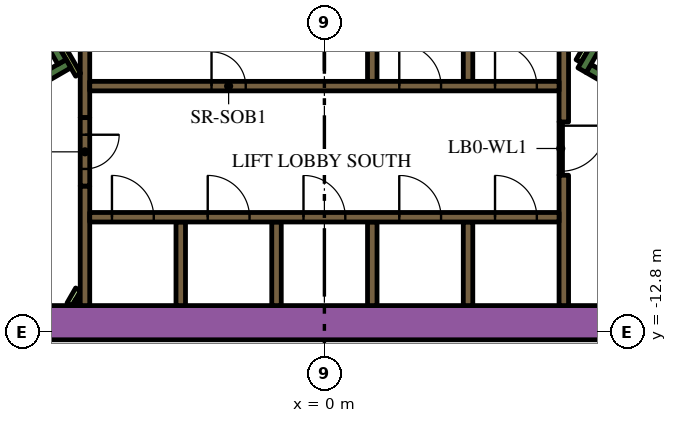
"""IFC4 building model, lengths in metres.
Left out: names, types, materials, properties, quantities, classifications, styles, units other than length and angle.
Written with IfcOpenShell. Run it as: python <this file> out.ifc"""

import sys

from ifc_helpers import new_model, si_unit, direction, frame, frame_2d, origin, place, context, subcontext, project, spatial, rectangle, extrude, element, fill, save


model = new_model("IFC4")
c1 = context("Model", 3, precision=1e-05, world=origin(), true_north=direction((0.0, 1.0)))
c2 = subcontext(c1, "Body", "Model", "MODEL_VIEW")
j1 = project(units=[si_unit("LENGTHUNIT", "METRE"), si_unit("PLANEANGLEUNIT", "RADIAN")], contexts=[c1])
p1 = place(None, origin())
s1 = spatial("IfcSite", under=j1, at=p1, CompositionType="ELEMENT")
p2 = place(p1, origin())
s2 = spatial("IfcBuilding", under=s1, at=p2, CompositionType="ELEMENT")
p3 = place(p2, frame((0.0, 0.0, 91.5)))
s3 = spatial("IfcBuildingStorey", under=s2, at=p3, CompositionType="ELEMENT", Elevation=91.5)
p4 = place(p3, frame((-12.019, -12.55, 0.0), z_axis=(0.0, 0.0, 1.0), x_axis=(1.0, 0.0, 0.0)))
e1 = element("IfcWall", 1, at=p4, inside=s3, PredefinedType="SOLIDWALL", context=c2, shape_type="SweptSolid", body=[
    extrude(rectangle(XDim=21.63, YDim=0.9, at=frame_2d((10.815, 0.0))), origin(), (0.0, 0.0, 1.0), 3.9),
])
p5 = place(p3, frame((12.84, -9.261, 0.0), z_axis=(0.0, 0.0, 1.0), x_axis=(-0.866013990052, 0.500019768644, 0.0)))
e2 = element("IfcWall", 2, at=p5, inside=s3, PredefinedType="SOLIDWALL", context=c2, shape_type="SweptSolid", body=[
    extrude(rectangle(XDim=6.8, YDim=0.25, at=frame_2d((3.4, 0.0))), origin(), (0.0, 0.0, 1.0), 3.9),
])
p6 = place(p3, frame((6.78, -5.906, 0.0), z_axis=(0.0, 0.0, 1.0), x_axis=(0.500223362819, 0.865896406789, 0.0)))
e3 = element("IfcWall", 3, at=p6, inside=s3, PredefinedType="SOLIDWALL", context=c2, shape_type="SweptSolid", body=[
    extrude(rectangle(XDim=0.675, YDim=0.25, at=frame_2d((0.337, 0.0))), origin(), (0.0, 0.0, 1.0), 3.9),
])
p7 = place(p3, frame((-12.84, -9.261, 0.0), z_axis=(0.0, 0.0, 1.0), x_axis=(0.866016039709, 0.500016218704, 0.0)))
e4 = element("IfcWall", 4, at=p7, inside=s3, PredefinedType="SOLIDWALL", context=c2, shape_type="SweptSolid", body=[
    extrude(rectangle(XDim=7.05, YDim=0.25, at=frame_2d((3.525, 0.0))), origin(), (0.0, 0.0, 1.0), 3.9),
])
p8 = place(p3, frame((-6.905, -5.69, 0.0), z_axis=(0.0, 0.0, 1.0), x_axis=(-0.500402024738, 0.865793170242, 0.0)))
e5 = element("IfcWall", 5, at=p8, inside=s3, PredefinedType="SOLIDWALL", context=c2, shape_type="SweptSolid", body=[
    extrude(rectangle(XDim=0.425, YDim=0.25, at=frame_2d((0.212, 0.0))), origin(), (0.0, 0.0, 1.0), 3.9),
])
p9 = place(p3, frame((-3.78, -12.1, 0.0), z_axis=(0.0, 0.0, 1.0), x_axis=(0.0, 1.0, 0.0)))
e6 = element("IfcWall", 6, at=p9, inside=s3, PredefinedType="SOLIDWALL", context=c2, shape_type="SweptSolid", body=[
    extrude(rectangle(XDim=2.2, YDim=0.25, at=frame_2d((1.1, 0.0))), origin(), (0.0, 0.0, 1.0), 3.9),
])
p10 = place(p3, frame((-6.3, -12.1, 0.0), z_axis=(0.0, 0.0, 1.0), x_axis=(0.0, 1.0, 0.0)))
e7 = element("IfcWall", 7, at=p10, inside=s3, PredefinedType="SOLIDWALL", context=c2, shape_type="SweptSolid", body=[
    extrude(rectangle(XDim=3.146, YDim=0.25, at=frame_2d((1.573, 0.0))), origin(), (0.0, 0.0, 1.0), 3.9),
])
p11 = place(p3, frame((6.3, -8.67, 0.0), z_axis=(0.0, 0.0, 1.0), x_axis=(0.0, -1.0, 0.0)))
e8 = element("IfcWall", 8, at=p11, inside=s3, PredefinedType="SOLIDWALL", context=c2, shape_type="SweptSolid", body=[
    extrude(rectangle(XDim=3.43, YDim=0.25, at=frame_2d((1.715, 0.0))), origin(), (0.0, 0.0, 1.0), 3.9),
])
p12 = place(p3, frame((6.3, -7.268, 0.0), z_axis=(0.0, 0.0, 1.0), x_axis=(0.0, 1.0, 0.0)))
e9 = element("IfcWall", 9, at=p12, inside=s3, PredefinedType="SOLIDWALL", context=c2, shape_type="SweptSolid", body=[
    extrude(rectangle(XDim=3.268, YDim=0.25, at=frame_2d((1.634, 0.0))), origin(), (0.0, 0.0, 1.0), 3.9),
])
for number, where, z_axis, x_axis in (
    (10, (3.78, -4.0, 0.0), (0.0, 0.0, 1.0), (0.0, -1.0, 0.0)),
    (11, (1.26, -4.0, 0.0), (0.0, 0.0, 1.0), (0.0, -1.0, 0.0)),
):
    element("IfcWall", number, at=place(p3, frame(where, z_axis=z_axis, x_axis=x_axis)), inside=s3, PredefinedType="SOLIDWALL", context=c2, shape_type="SweptSolid", body=[
        extrude(rectangle(XDim=2.2, YDim=0.25, at=frame_2d((1.1, 0.0))), origin(), (0.0, 0.0, 1.0), 3.9),
    ])
p13 = place(p3, frame((-6.3, -4.0, 0.0), z_axis=(0.0, 0.0, 1.0), x_axis=(0.0, -1.0, 0.0)))
e12 = element("IfcWall", 12, at=p13, inside=s3, PredefinedType="SOLIDWALL", context=c2, shape_type="SweptSolid", body=[
    extrude(rectangle(XDim=3.154, YDim=0.25, at=frame_2d((1.577, 0.0))), origin(), (0.0, 0.0, 1.0), 3.9),
])
for number, where, z_axis, x_axis in (
    (13, (3.78, -12.1, 0.0), (0.0, 0.0, 1.0), (0.0, 1.0, 0.0)),
    (14, (1.26, -12.1, 0.0), (0.0, 0.0, 1.0), (0.0, 1.0, 0.0)),
    (15, (-1.26, -12.1, 0.0), (0.0, 0.0, 1.0), (0.0, 1.0, 0.0)),
):
    element("IfcWall", number, at=place(p3, frame(where, z_axis=z_axis, x_axis=x_axis)), inside=s3, PredefinedType="SOLIDWALL", context=c2, shape_type="SweptSolid", body=[
        extrude(rectangle(XDim=2.2, YDim=0.25, at=frame_2d((1.1, 0.0))), origin(), (0.0, 0.0, 1.0), 3.9),
    ])
p14 = place(p3, frame((-6.708, -12.068, 0.0), z_axis=(0.0, 0.0, 1.0), x_axis=(0.500000789788, 0.8660249478, 0.0)))
e16 = element("IfcWall", 16, at=p14, inside=s3, PredefinedType="PARTITIONING", context=c2, shape_type="SweptSolid", body=[
    extrude(rectangle(XDim=0.456, YDim=0.15, at=frame_2d((0.228, 0.0))), origin(), (0.0, 0.0, 1.0), 2.75),
])
p15 = place(p3, frame((-6.534, -12.068, 0.0), z_axis=(0.0, 0.0, 1.0), x_axis=(0.500240224089, 0.865886665912, 0.0)))
e17 = element("IfcWall", 17, at=p15, inside=s3, PredefinedType="PARTITIONING", context=c2, shape_type="SweptSolid", body=[
    extrude(rectangle(XDim=0.109, YDim=0.15, at=frame_2d((0.054, 0.0))), origin(), (0.0, 0.0, 1.0), 2.75),
])
p16 = place(p3, frame((-6.48, -6.027, 0.0), z_axis=(0.0, 0.0, 1.0), x_axis=(-0.499927229454, 0.866067413802, 0.0)))
e18 = element("IfcWall", 18, at=p16, inside=s3, PredefinedType="PARTITIONING", context=c2, shape_type="SweptSolid", body=[
    extrude(rectangle(XDim=0.929, YDim=0.15, at=frame_2d((0.464, 0.0))), origin(), (0.0, 0.0, 1.0), 3.9),
])
p17 = place(p3, frame((6.945, -5.222, 0.0), z_axis=(0.0, 0.0, 1.0), x_axis=(-0.499818422106, -0.866130212453, 0.0)))
e19 = element("IfcWall", 19, at=p17, inside=s3, PredefinedType="PARTITIONING", context=c2, shape_type="SweptSolid", body=[
    extrude(rectangle(XDim=0.514, YDim=0.15, at=frame_2d((0.257, 0.0))), origin(), (0.0, 0.0, 1.0), 2.75),
])
p18 = place(p3, frame((-6.175, -9.775, 0.0), z_axis=(0.0, 0.0, 1.0), x_axis=(1.0, 0.0, 0.0)))
e20 = element("IfcWall", 20, at=p18, inside=s3, PredefinedType="SOLIDWALL", context=c2, shape_type="SweptSolid", body=[
    extrude(rectangle(XDim=12.35, YDim=0.25, at=frame_2d((6.175, 0.0))), origin(), (0.0, 0.0, 1.0), 3.9),
])
p19 = place(p18, frame((0.585, 0.0, 0.0)))
e21 = element("IfcOpeningElement", 21, at=p19, cuts=e20, PredefinedType="OPENING", context=c2, shape_type="SweptSolid", body=[
    extrude(rectangle(XDim=1.1, YDim=2.1, at=frame_2d((0.55, 1.05))), frame((0.0, 0.135, 0.0), z_axis=(0.0, -1.0, 0.0), x_axis=(1.0, 0.0, 0.0)), (0.0, 0.0, 1.0), 0.27),
])
p20 = place(p18, frame((3.105, 0.0, 0.0)))
e22 = element("IfcOpeningElement", 22, at=p20, cuts=e20, PredefinedType="OPENING", context=c2, shape_type="SweptSolid", body=[
    extrude(rectangle(XDim=1.1, YDim=2.1, at=frame_2d((0.55, 1.05))), frame((0.0, 0.135, 0.0), z_axis=(0.0, -1.0, 0.0), x_axis=(1.0, 0.0, 0.0)), (0.0, 0.0, 1.0), 0.27),
])
p21 = place(p18, frame((5.625, 0.0, 0.0)))
e23 = element("IfcOpeningElement", 23, at=p21, cuts=e20, PredefinedType="OPENING", context=c2, shape_type="SweptSolid", body=[
    extrude(rectangle(XDim=1.1, YDim=2.1, at=frame_2d((0.55, 1.05))), frame((0.0, 0.135, 0.0), z_axis=(0.0, -1.0, 0.0), x_axis=(1.0, 0.0, 0.0)), (0.0, 0.0, 1.0), 0.27),
])
p22 = place(p18, frame((8.145, 0.0, 0.0)))
e24 = element("IfcOpeningElement", 24, at=p22, cuts=e20, PredefinedType="OPENING", context=c2, shape_type="SweptSolid", body=[
    extrude(rectangle(XDim=1.1, YDim=2.1, at=frame_2d((0.55, 1.05))), frame((0.0, 0.135, 0.0), z_axis=(0.0, -1.0, 0.0), x_axis=(1.0, 0.0, 0.0)), (0.0, 0.0, 1.0), 0.27),
])
p23 = place(p18, frame((10.665, 0.0, 0.0)))
e25 = element("IfcOpeningElement", 25, at=p23, cuts=e20, PredefinedType="OPENING", context=c2, shape_type="SweptSolid", body=[
    extrude(rectangle(XDim=1.1, YDim=2.1, at=frame_2d((0.55, 1.05))), frame((0.0, 0.135, 0.0), z_axis=(0.0, -1.0, 0.0), x_axis=(1.0, 0.0, 0.0)), (0.0, 0.0, 1.0), 0.27),
])
p24 = place(p3, frame((-6.175, -6.325, 0.0), z_axis=(0.0, 0.0, 1.0), x_axis=(1.0, 0.0, 0.0)))
e26 = element("IfcWall", 26, at=p24, inside=s3, PredefinedType="SOLIDWALL", context=c2, shape_type="SweptSolid", body=[
    extrude(rectangle(XDim=12.35, YDim=0.25, at=frame_2d((6.175, 0.0))), origin(), (0.0, 0.0, 1.0), 3.9),
])
p25 = place(p24, frame((3.205, 0.0, 0.0)))
e27 = element("IfcOpeningElement", 27, at=p25, cuts=e26, PredefinedType="OPENING", context=c2, shape_type="SweptSolid", body=[
    extrude(rectangle(XDim=0.9, YDim=2.1, at=frame_2d((0.45, 1.05))), frame((0.0, 0.135, 0.0), z_axis=(0.0, -1.0, 0.0), x_axis=(1.0, 0.0, 0.0)), (0.0, 0.0, 1.0), 0.27),
])
p26 = place(p24, frame((8.145, 0.0, 0.0)))
e28 = element("IfcOpeningElement", 28, at=p26, cuts=e26, PredefinedType="OPENING", context=c2, shape_type="SweptSolid", body=[
    extrude(rectangle(XDim=1.1, YDim=2.1, at=frame_2d((0.55, 1.05))), frame((0.0, 0.135, 0.0), z_axis=(0.0, -1.0, 0.0), x_axis=(1.0, 0.0, 0.0)), (0.0, 0.0, 1.0), 0.27),
])
p27 = place(p24, frame((10.665, 0.0, 0.0)))
e29 = element("IfcOpeningElement", 29, at=p27, cuts=e26, PredefinedType="OPENING", context=c2, shape_type="SweptSolid", body=[
    extrude(rectangle(XDim=1.1, YDim=2.1, at=frame_2d((0.55, 1.05))), frame((0.0, 0.135, 0.0), z_axis=(0.0, -1.0, 0.0), x_axis=(1.0, 0.0, 0.0)), (0.0, 0.0, 1.0), 0.27),
])
p28 = place(p3, frame((-6.3, -7.154, 0.0), z_axis=(0.0, 0.0, 1.0), x_axis=(0.0, -1.0, 0.0)))
e30 = element("IfcWall", 30, at=p28, inside=s3, PredefinedType="SOLIDWALL", context=c2, shape_type="SweptSolid", body=[
    extrude(rectangle(XDim=1.8, YDim=0.25, at=frame_2d((0.9, 0.0))), origin(), (0.0, 0.0, 1.0), 3.9),
])
p29 = place(p28, frame((0.45, 0.0, 0.0)))
e31 = element("IfcOpeningElement", 31, at=p29, cuts=e30, PredefinedType="OPENING", context=c2, shape_type="SweptSolid", body=[
    extrude(rectangle(XDim=0.9, YDim=2.1, at=frame_2d((0.45, 1.05))), frame((0.0, 0.135, 0.0), z_axis=(0.0, -1.0, 0.0), x_axis=(1.0, 0.0, 0.0)), (0.0, 0.0, 1.0), 0.27),
])
p30 = place(p3, frame((6.22, -7.266, 0.0), z_axis=(0.0, 0.0, 1.0), x_axis=(0.0, -1.0, 0.0)))
e32 = element("IfcWall", 32, at=p30, inside=s3, PredefinedType="PARTITIONING", context=c2, shape_type="SweptSolid", body=[
    extrude(rectangle(XDim=1.4, YDim=0.09, at=frame_2d((0.7, 0.0))), origin(), (0.0, 0.0, 1.0), 2.75),
])
p31 = place(p30, frame((0.1, 0.0, 0.0)))
e33 = element("IfcOpeningElement", 33, at=p31, cuts=e32, PredefinedType="OPENING", context=c2, shape_type="SweptSolid", body=[
    extrude(rectangle(XDim=1.2, YDim=2.1, at=frame_2d((0.6, 1.05))), frame((0.0, 0.055, 0.0), z_axis=(0.0, -1.0, 0.0), x_axis=(1.0, 0.0, 0.0)), (0.0, 0.0, 1.0), 0.11),
])
p32 = place(p19, origin())
e34 = element("IfcDoor", 34, at=p32, inside=s3, OperationType="DOUBLE_DOOR_SLIDING", PredefinedType="DOOR", context=c2, shape_type="SweptSolid", body=[
    extrude(rectangle(XDim=1.1, YDim=2.1, at=frame_2d((0.55, 1.05))), frame((0.0, 0.025, 0.0), z_axis=(0.0, -1.0, 0.0), x_axis=(1.0, 0.0, 0.0)), (0.0, 0.0, 1.0), 0.05),
])
fill(e21, e34)
p33 = place(p20, origin())
e35 = element("IfcDoor", 35, at=p33, inside=s3, OperationType="DOUBLE_DOOR_SLIDING", PredefinedType="DOOR", context=c2, shape_type="SweptSolid", body=[
    extrude(rectangle(XDim=1.1, YDim=2.1, at=frame_2d((0.55, 1.05))), frame((0.0, 0.025, 0.0), z_axis=(0.0, -1.0, 0.0), x_axis=(1.0, 0.0, 0.0)), (0.0, 0.0, 1.0), 0.05),
])
fill(e22, e35)
p34 = place(p21, origin())
e36 = element("IfcDoor", 36, at=p34, inside=s3, OperationType="DOUBLE_DOOR_SLIDING", PredefinedType="DOOR", context=c2, shape_type="SweptSolid", body=[
    extrude(rectangle(XDim=1.1, YDim=2.1, at=frame_2d((0.55, 1.05))), frame((0.0, 0.025, 0.0), z_axis=(0.0, -1.0, 0.0), x_axis=(1.0, 0.0, 0.0)), (0.0, 0.0, 1.0), 0.05),
])
fill(e23, e36)
p35 = place(p22, origin())
e37 = element("IfcDoor", 37, at=p35, inside=s3, OperationType="DOUBLE_DOOR_SLIDING", PredefinedType="DOOR", context=c2, shape_type="SweptSolid", body=[
    extrude(rectangle(XDim=1.1, YDim=2.1, at=frame_2d((0.55, 1.05))), frame((0.0, 0.025, 0.0), z_axis=(0.0, -1.0, 0.0), x_axis=(1.0, 0.0, 0.0)), (0.0, 0.0, 1.0), 0.05),
])
fill(e24, e37)
p36 = place(p23, origin())
e38 = element("IfcDoor", 38, at=p36, inside=s3, OperationType="DOUBLE_DOOR_SLIDING", PredefinedType="DOOR", context=c2, shape_type="SweptSolid", body=[
    extrude(rectangle(XDim=1.1, YDim=2.1, at=frame_2d((0.55, 1.05))), frame((0.0, 0.025, 0.0), z_axis=(0.0, -1.0, 0.0), x_axis=(1.0, 0.0, 0.0)), (0.0, 0.0, 1.0), 0.05),
])
fill(e25, e38)
p37 = place(p25, origin())
e39 = element("IfcDoor", 39, at=p37, inside=s3, OperationType="SINGLE_SWING_LEFT", PredefinedType="DOOR", context=c2, shape_type="SweptSolid", body=[
    extrude(rectangle(XDim=0.9, YDim=2.1, at=frame_2d((0.45, 1.05))), frame((0.0, 0.025, 0.0), z_axis=(0.0, -1.0, 0.0), x_axis=(1.0, 0.0, 0.0)), (0.0, 0.0, 1.0), 0.05),
])
fill(e27, e39)
p38 = place(p26, origin())
e40 = element("IfcDoor", 40, at=p38, inside=s3, OperationType="DOUBLE_DOOR_SLIDING", PredefinedType="DOOR", context=c2, shape_type="SweptSolid", body=[
    extrude(rectangle(XDim=1.1, YDim=2.1, at=frame_2d((0.55, 1.05))), frame((0.0, 0.025, 0.0), z_axis=(0.0, -1.0, 0.0), x_axis=(1.0, 0.0, 0.0)), (0.0, 0.0, 1.0), 0.05),
])
fill(e28, e40)
p39 = place(p27, origin())
e41 = element("IfcDoor", 41, at=p39, inside=s3, OperationType="DOUBLE_DOOR_SLIDING", PredefinedType="DOOR", context=c2, shape_type="SweptSolid", body=[
    extrude(rectangle(XDim=1.1, YDim=2.1, at=frame_2d((0.55, 1.05))), frame((0.0, 0.025, 0.0), z_axis=(0.0, -1.0, 0.0), x_axis=(1.0, 0.0, 0.0)), (0.0, 0.0, 1.0), 0.05),
])
fill(e29, e41)
p40 = place(p29, origin())
e42 = element("IfcDoor", 42, at=p40, inside=s3, OperationType="SINGLE_SWING_LEFT", PredefinedType="DOOR", context=c2, shape_type="SweptSolid", body=[
    extrude(rectangle(XDim=0.9, YDim=2.1, at=frame_2d((0.45, 1.05))), frame((0.0, 0.025, 0.0), z_axis=(0.0, -1.0, 0.0), x_axis=(1.0, 0.0, 0.0)), (0.0, 0.0, 1.0), 0.05),
])
fill(e31, e42)
p41 = place(p31, origin())
e43 = element("IfcDoor", 43, at=p41, inside=s3, OperationType="SINGLE_SWING_LEFT", PredefinedType="DOOR", context=c2, shape_type="SweptSolid", body=[
    extrude(rectangle(XDim=1.2, YDim=2.1, at=frame_2d((0.6, 1.05))), frame((0.0, 0.025, 0.0), z_axis=(0.0, -1.0, 0.0), x_axis=(1.0, 0.0, 0.0)), (0.0, 0.0, 1.0), 0.05),
])
fill(e33, e43)
save(model, sys.argv[1])
